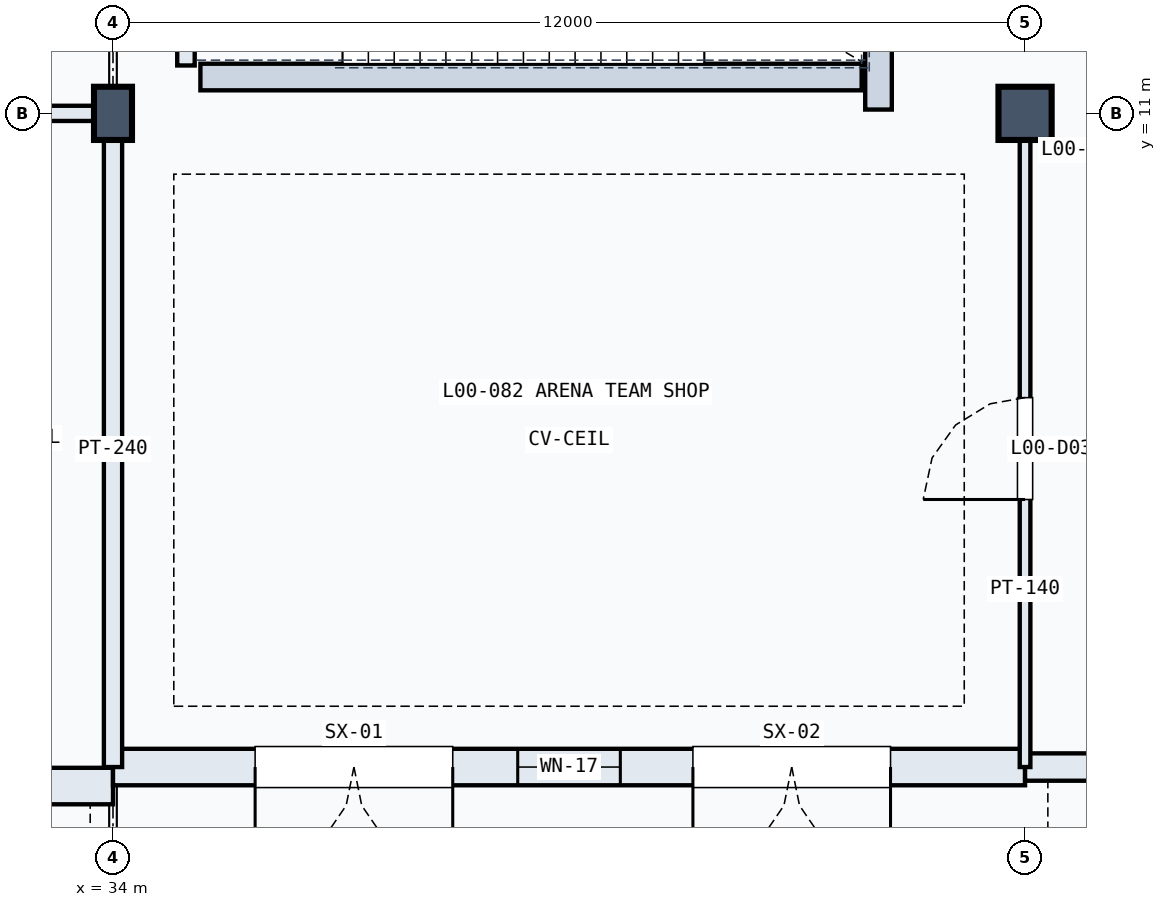
"""IFC4 building model, lengths in metres.
Left out: names, types, materials, properties, quantities, classifications, styles, units other than length and angle.
Written with IfcOpenShell. Run it as: python <this file> out.ifc"""

import sys

from ifc_helpers import new_model, si_unit, direction, frame, frame_2d, origin, origin_2d, place, context, subcontext, project, spatial, rectangle, extrude, element, fill, save


model = new_model("IFC4")
c1 = context("Model", 3, precision=1e-05, world=origin(), true_north=direction((0.0, 1.0)))
c2 = subcontext(c1, "Body", "Model", "MODEL_VIEW")
j1 = project(units=[si_unit("LENGTHUNIT", "METRE"), si_unit("PLANEANGLEUNIT", "RADIAN")], contexts=[c1])
p1 = place(None, origin())
s1 = spatial("IfcSite", under=j1, at=p1, CompositionType="ELEMENT")
p2 = place(p1, origin())
s2 = spatial("IfcBuilding", under=s1, at=p2, CompositionType="ELEMENT")
p3 = place(p2, origin())
s3 = spatial("IfcBuildingStorey", under=s2, at=p3, CompositionType="ELEMENT", Elevation=0.0)
p4 = place(p3, frame((34.0, 11.0, 0.0), z_axis=(0.0, 0.0, 1.0), x_axis=(1.0, 0.0, 0.0)))
e1 = element("IfcColumn", 1, at=p4, inside=s3, PredefinedType="COLUMN", context=c2, shape_type="SweptSolid", body=[
    extrude(rectangle(XDim=0.5, YDim=0.7, at=origin_2d()), origin(), (0.0, 0.0, 1.0), 5.4),
])
p5 = place(p3, frame((46.0, 11.0, 0.0), z_axis=(0.0, 0.0, 1.0), x_axis=(1.0, 0.0, 0.0)))
e2 = element("IfcColumn", 2, at=p5, inside=s3, PredefinedType="COLUMN", context=c2, shape_type="SweptSolid", body=[
    extrude(rectangle(XDim=0.7, YDim=0.7, at=origin_2d()), origin(), (0.0, 0.0, 1.0), 5.4),
])
p6 = place(p3, frame((22.0, 2.15, 0.0), z_axis=(0.0, 0.0, 1.0), x_axis=(1.0, 0.0, 0.0)))
e3 = element("IfcWall", 3, at=p6, inside=s3, PredefinedType="SOLIDWALL", context=c2, shape_type="SweptSolid", body=[
    extrude(rectangle(XDim=12.0, YDim=0.48, at=frame_2d((6.0, 0.0))), origin(), (0.0, 0.0, 1.0), 4.43),
])
p7 = place(p6, frame((1.87, 0.0, 0.0)))
e4 = element("IfcOpeningElement", 4, at=p7, cuts=e3, PredefinedType="OPENING", context=c2, shape_type="SweptSolid", body=[
    extrude(rectangle(XDim=2.5, YDim=2.6, at=frame_2d((1.25, 1.3))), frame((0.0, 0.25, 0.0), z_axis=(0.0, -1.0, 0.0), x_axis=(1.0, 0.0, 0.0)), (0.0, 0.0, 1.0), 0.5),
])
p8 = place(p6, frame((7.63, 0.0, 0.0)))
e5 = element("IfcOpeningElement", 5, at=p8, cuts=e3, PredefinedType="OPENING", context=c2, shape_type="SweptSolid", body=[
    extrude(rectangle(XDim=2.5, YDim=2.6, at=frame_2d((1.25, 1.3))), frame((0.0, 0.25, 0.0), z_axis=(0.0, -1.0, 0.0), x_axis=(1.0, 0.0, 0.0)), (0.0, 0.0, 1.0), 0.5),
])
p9 = place(p6, frame((5.55, 0.0, 0.9)))
e6 = element("IfcOpeningElement", 6, at=p9, cuts=e3, PredefinedType="OPENING", context=c2, shape_type="SweptSolid", body=[
    extrude(rectangle(XDim=0.9, YDim=1.8, at=frame_2d((0.45, 0.9))), frame((0.0, 0.25, 0.0), z_axis=(0.0, -1.0, 0.0), x_axis=(1.0, 0.0, 0.0)), (0.0, 0.0, 1.0), 0.5),
])
p10 = place(p3, frame((34.0, 2.4, 0.0), z_axis=(0.0, 0.0, 1.0), x_axis=(1.0, 0.0, 0.0)))
e7 = element("IfcWall", 7, at=p10, inside=s3, PredefinedType="SOLIDWALL", context=c2, shape_type="SweptSolid", body=[
    extrude(rectangle(XDim=12.0, YDim=0.48, at=frame_2d((6.0, 0.0))), origin(), (0.0, 0.0, 1.0), 4.1),
])
p11 = place(p10, frame((1.87, 0.0, 0.0)))
e8 = element("IfcOpeningElement", 8, at=p11, cuts=e7, PredefinedType="OPENING", context=c2, shape_type="SweptSolid", body=[
    extrude(rectangle(XDim=2.6, YDim=2.4, at=frame_2d((1.3, 1.2))), frame((0.0, 0.25, 0.0), z_axis=(0.0, -1.0, 0.0), x_axis=(1.0, 0.0, 0.0)), (0.0, 0.0, 1.0), 0.5),
])
p12 = place(p10, frame((7.63, 0.0, 0.0)))
e9 = element("IfcOpeningElement", 9, at=p12, cuts=e7, PredefinedType="OPENING", context=c2, shape_type="SweptSolid", body=[
    extrude(rectangle(XDim=2.6, YDim=2.4, at=frame_2d((1.3, 1.2))), frame((0.0, 0.25, 0.0), z_axis=(0.0, -1.0, 0.0), x_axis=(1.0, 0.0, 0.0)), (0.0, 0.0, 1.0), 0.5),
])
p13 = place(p10, frame((5.325, 0.0, 0.8)))
e10 = element("IfcOpeningElement", 10, at=p13, cuts=e7, PredefinedType="OPENING", context=c2, shape_type="SweptSolid", body=[
    extrude(rectangle(XDim=1.35, YDim=2.1, at=frame_2d((0.675, 1.05))), frame((0.0, 0.25, 0.0), z_axis=(0.0, -1.0, 0.0), x_axis=(1.0, 0.0, 0.0)), (0.0, 0.0, 1.0), 0.5),
])
p14 = place(p3, frame((46.0, 2.4, 0.0), z_axis=(0.0, 0.0, 1.0), x_axis=(1.0, 0.0, 0.0)))
e11 = element("IfcWall", 11, at=p14, inside=s3, PredefinedType="SOLIDWALL", context=c2, shape_type="SweptSolid", body=[
    extrude(rectangle(XDim=12.0, YDim=0.36, at=frame_2d((6.0, 0.0))), origin(), (0.0, 0.0, 1.0), 4.1),
])
p15 = place(p14, frame((1.87, 0.0, 0.0)))
e12 = element("IfcOpeningElement", 12, at=p15, cuts=e11, PredefinedType="OPENING", context=c2, shape_type="SweptSolid", body=[
    extrude(rectangle(XDim=2.6, YDim=2.4, at=frame_2d((1.3, 1.2))), frame((0.0, 0.19, 0.0), z_axis=(0.0, -1.0, 0.0), x_axis=(1.0, 0.0, 0.0)), (0.0, 0.0, 1.0), 0.38),
])
p16 = place(p14, frame((7.63, 0.0, 0.0)))
e13 = element("IfcOpeningElement", 13, at=p16, cuts=e11, PredefinedType="OPENING", context=c2, shape_type="SweptSolid", body=[
    extrude(rectangle(XDim=2.6, YDim=2.4, at=frame_2d((1.3, 1.2))), frame((0.0, 0.19, 0.0), z_axis=(0.0, -1.0, 0.0), x_axis=(1.0, 0.0, 0.0)), (0.0, 0.0, 1.0), 0.38),
])
p17 = place(p3, frame((34.96, 11.63, 0.0), z_axis=(0.0, 0.0, 1.0), x_axis=(0.0, 1.0, 0.0)))
e14 = element("IfcWall", 14, at=p17, inside=s3, PredefinedType="SOLIDWALL", context=c2, shape_type="SweptSolid", body=[
    extrude(rectangle(XDim=4.08, YDim=0.23, at=frame_2d((2.04, 0.0))), origin(), (0.0, 0.0, 1.0), 4.45),
])
p18 = place(p3, frame((44.072, 11.05, 0.0), z_axis=(0.0, 0.0, 1.0), x_axis=(0.0, 1.0, 0.0)))
e15 = element("IfcWall", 15, at=p18, inside=s3, PredefinedType="SOLIDWALL", context=c2, shape_type="SweptSolid", body=[
    extrude(rectangle(XDim=4.54, YDim=0.35, at=frame_2d((2.27, 0.0))), origin(), (0.0, 0.0, 1.0), 5.06),
])
p19 = place(p3, frame((35.15, 11.478, 0.0), z_axis=(0.0, 0.0, 1.0), x_axis=(1.0, 0.0, 0.0)))
e16 = element("IfcWall", 16, at=p19, inside=s3, PredefinedType="SOLIDWALL", context=c2, shape_type="SweptSolid", body=[
    extrude(rectangle(XDim=8.7, YDim=0.35, at=frame_2d((4.35, 0.0))), origin(), (0.0, 0.0, 1.0), 5.06),
])
p20 = place(p3, frame((28.0, 11.0, 0.0), z_axis=(0.0, 0.0, 1.0), x_axis=(1.0, 0.0, 0.0)))
e17 = element("IfcWall", 17, at=p20, inside=s3, PredefinedType="PARTITIONING", context=c2, shape_type="SweptSolid", body=[
    extrude(rectangle(XDim=5.78, YDim=0.2, at=frame_2d((2.89, 0.0))), origin(), (0.0, 0.0, 1.0), 4.366),
])
p21 = place(p20, frame((2.42, 0.0, 0.0)))
e18 = element("IfcOpeningElement", 18, at=p21, cuts=e17, PredefinedType="OPENING", context=c2, shape_type="SweptSolid", body=[
    extrude(rectangle(XDim=0.94, YDim=2.15, at=frame_2d((0.47, 1.075))), frame((0.0, 0.11, 0.0), z_axis=(0.0, -1.0, 0.0), x_axis=(1.0, 0.0, 0.0)), (0.0, 0.0, 1.0), 0.22),
])
p22 = place(p3, frame((46.0, 2.4, 0.0), z_axis=(0.0, 0.0, 1.0), x_axis=(0.0, 1.0, 0.0)))
e19 = element("IfcWall", 19, at=p22, inside=s3, PredefinedType="PARTITIONING", context=c2, shape_type="SweptSolid", body=[
    extrude(rectangle(XDim=8.38, YDim=0.14, at=frame_2d((4.19, 0.0))), origin(), (0.0, 0.0, 1.0), 4.1),
])
p23 = place(p22, frame((3.52, 0.0, 0.0)))
e20 = element("IfcOpeningElement", 20, at=p23, cuts=e19, PredefinedType="OPENING", context=c2, shape_type="SweptSolid", body=[
    extrude(rectangle(XDim=1.34, YDim=2.15, at=frame_2d((0.67, 1.075))), frame((0.0, 0.08, 0.0), z_axis=(0.0, -1.0, 0.0), x_axis=(1.0, 0.0, 0.0)), (0.0, 0.0, 1.0), 0.16),
])
p24 = place(p3, frame((34.0, 2.4, 0.0), z_axis=(0.0, 0.0, 1.0), x_axis=(0.0, 1.0, 0.0)))
e21 = element("IfcWall", 21, at=p24, inside=s3, PredefinedType="PARTITIONING", context=c2, shape_type="SweptSolid", body=[
    extrude(rectangle(XDim=8.38, YDim=0.24, at=frame_2d((4.19, 0.0))), origin(), (0.0, 0.0, 1.0), 4.366),
])
p25 = place(p11, frame((2.6, 0.0, 0.0), z_axis=(0.0, 0.0, 1.0), x_axis=(-1.0, 0.0, 0.0)))
e22 = element("IfcDoor", 22, at=p25, inside=s3, OperationType="DOUBLE_DOOR_SINGLE_SWING", PredefinedType="DOOR", context=c2, shape_type="SweptSolid", body=[
    extrude(rectangle(XDim=2.6, YDim=2.4, at=frame_2d((1.3, 1.2))), frame((0.0, 0.025, 0.0), z_axis=(0.0, -1.0, 0.0), x_axis=(1.0, 0.0, 0.0)), (0.0, 0.0, 1.0), 0.05),
])
fill(e8, e22)
p26 = place(p12, frame((2.6, 0.0, 0.0), z_axis=(0.0, 0.0, 1.0), x_axis=(-1.0, 0.0, 0.0)))
e23 = element("IfcDoor", 23, at=p26, inside=s3, OperationType="DOUBLE_DOOR_SINGLE_SWING", PredefinedType="DOOR", context=c2, shape_type="SweptSolid", body=[
    extrude(rectangle(XDim=2.6, YDim=2.4, at=frame_2d((1.3, 1.2))), frame((0.0, 0.025, 0.0), z_axis=(0.0, -1.0, 0.0), x_axis=(1.0, 0.0, 0.0)), (0.0, 0.0, 1.0), 0.05),
])
fill(e9, e23)
p27 = place(p13, origin())
e24 = element("IfcWindow", 24, at=p27, inside=s3, PartitioningType="SINGLE_PANEL", PredefinedType="WINDOW", context=c2, shape_type="SweptSolid", body=[
    extrude(rectangle(XDim=1.35, YDim=2.1, at=frame_2d((0.675, 1.05))), frame((0.0, 0.03, 0.0), z_axis=(0.0, -1.0, 0.0), x_axis=(1.0, 0.0, 0.0)), (0.0, 0.0, 1.0), 0.06),
])
fill(e10, e24)
p28 = place(p23, origin())
e25 = element("IfcDoor", 25, at=p28, inside=s3, OperationType="SINGLE_SWING_LEFT", PredefinedType="DOOR", context=c2, shape_type="SweptSolid", body=[
    extrude(rectangle(XDim=1.34, YDim=2.15, at=frame_2d((0.67, 1.075))), frame((0.0, 0.025, 0.0), z_axis=(0.0, -1.0, 0.0), x_axis=(1.0, 0.0, 0.0)), (0.0, 0.0, 1.0), 0.05),
])
fill(e20, e25)
save(model, sys.argv[1])
